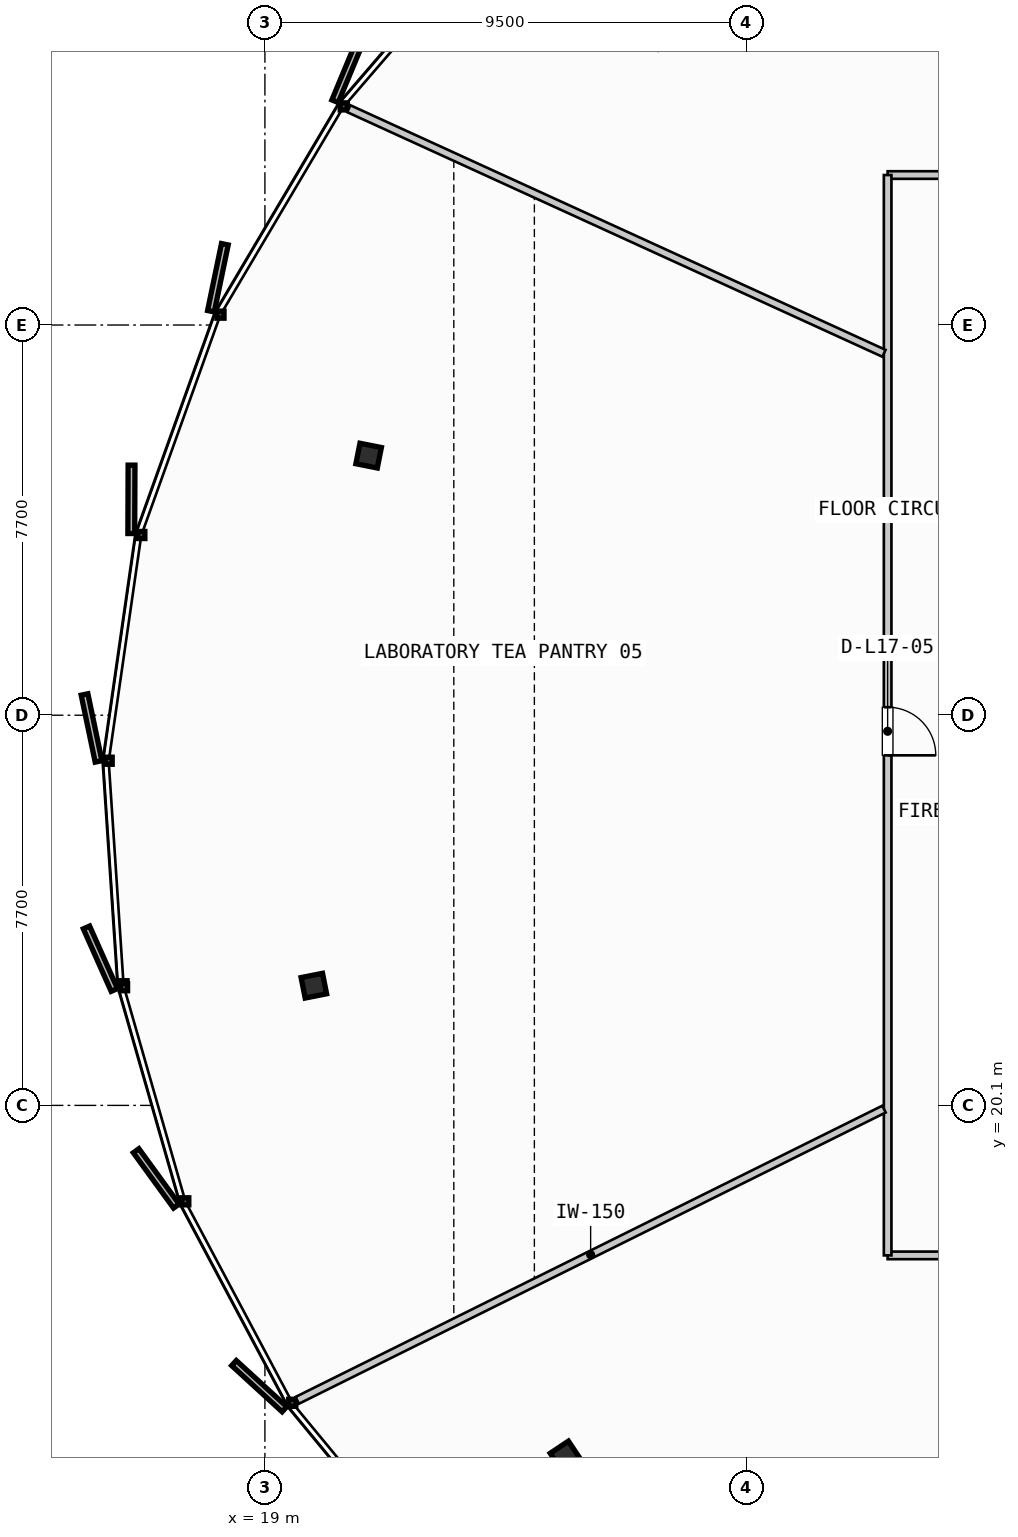
"""IFC4 building model, lengths in metres.
Left out: names, types, materials, properties, quantities, classifications, styles, units other than length and angle.
Written with IfcOpenShell. Run it as: python <this file> out.ifc"""

import sys

from ifc_helpers import new_model, si_unit, direction, frame, frame_2d, origin, origin_2d, place, context, subcontext, project, spatial, rectangle, i_section, extrude, source, transform, mapped, element, fill, save


model = new_model("IFC4")
c1 = context("Model", 3, precision=1e-05, world=origin(), true_north=direction((0.0, 1.0)))
c2 = subcontext(c1, "Body", "Model", "MODEL_VIEW")
j1 = project(units=[si_unit("LENGTHUNIT", "METRE"), si_unit("PLANEANGLEUNIT", "RADIAN")], contexts=[c1])
p1 = place(None, origin())
s1 = spatial("IfcSite", under=j1, at=p1, CompositionType="ELEMENT")
p2 = place(p1, origin())
s2 = spatial("IfcBuilding", under=s1, at=p2, CompositionType="ELEMENT")
p3 = place(p2, frame((0.0, 0.0, 71.4)))
s3 = spatial("IfcBuildingStorey", under=s2, at=p3, CompositionType="ELEMENT", Elevation=71.4)
m1 = source(origin(), c2, "Body", "SweptSolid", [
    extrude(i_section(OverallWidth=0.412, OverallDepth=0.431, WebThickness=0.042, FlangeThickness=0.068, FilletRadius=0.015, at=origin_2d()), origin(), (0.0, 0.0, 1.0), 3.54),
])
for number, where, z_axis, x_axis in (
    (1, (21.047, 32.923, 0.0), (0.0, 0.0, 1.0), (-0.981, 0.195, 0.0)),
    (2, (19.966, 22.462, 0.0), (0.0, 0.0, 1.0), (-0.981, -0.195, 0.0)),
    (3, (24.925, 13.183, 0.0), (0.0, 0.0, 1.0), (-0.831, -0.556, 0.0)),
):
    element("IfcColumn", number, at=place(p3, frame(where, z_axis=z_axis, x_axis=x_axis)), inside=s3, PredefinedType="COLUMN", context=c2, shape_type="MappedRepresentation", body=[
        mapped(m1, transform((0.0, 0.0, 0.0), scale=1.0)),
    ])
p4 = place(p3, frame((31.29, 17.14, 0.0), z_axis=(0.0, 0.0, 1.0), x_axis=(1.0, 0.0, 0.0)))
e4 = element("IfcWall", 4, at=p4, inside=s3, PredefinedType="PARTITIONING", context=c2, shape_type="SweptSolid", body=[
    extrude(rectangle(XDim=29.46, YDim=0.15, at=frame_2d((14.73, 0.0))), origin(), (0.0, 0.0, 1.0), 2.495),
])
p5 = place(p4, frame((14.255, 0.0, 0.0)))
e5 = element("IfcOpeningElement", 5, at=p5, cuts=e4, PredefinedType="OPENING", context=c2, shape_type="SweptSolid", body=[
    extrude(rectangle(XDim=0.95, YDim=2.15, at=frame_2d((0.475, 1.075))), frame((0.0, 0.085, 0.0), z_axis=(0.0, -1.0, 0.0), x_axis=(1.0, 0.0, 0.0)), (0.0, 0.0, 1.0), 0.17),
])
p6 = place(p3, frame((60.75, 38.46, 0.0), z_axis=(0.0, 0.0, 1.0), x_axis=(-1.0, 0.0, 0.0)))
e6 = element("IfcWall", 6, at=p6, inside=s3, PredefinedType="PARTITIONING", context=c2, shape_type="SweptSolid", body=[
    extrude(rectangle(XDim=29.46, YDim=0.15, at=frame_2d((14.73, 0.0))), origin(), (0.0, 0.0, 1.0), 2.495),
])
p7 = place(p6, frame((7.337, 0.0, 0.0)))
e7 = element("IfcOpeningElement", 7, at=p7, cuts=e6, PredefinedType="OPENING", context=c2, shape_type="SweptSolid", body=[
    extrude(rectangle(XDim=0.95, YDim=2.15, at=frame_2d((0.475, 1.075))), frame((0.0, 0.085, 0.0), z_axis=(0.0, -1.0, 0.0), x_axis=(1.0, 0.0, 0.0)), (0.0, 0.0, 1.0), 0.17),
])
p8 = place(p6, frame((20.722, 0.0, 0.0)))
e8 = element("IfcOpeningElement", 8, at=p8, cuts=e6, PredefinedType="OPENING", context=c2, shape_type="SweptSolid", body=[
    extrude(rectangle(XDim=0.95, YDim=2.15, at=frame_2d((0.475, 1.075))), frame((0.0, 0.085, 0.0), z_axis=(0.0, -1.0, 0.0), x_axis=(1.0, 0.0, 0.0)), (0.0, 0.0, 1.0), 0.17),
])
p9 = place(p3, frame((31.29, 38.46, 0.0), z_axis=(0.0, 0.0, 1.0), x_axis=(0.0, -1.0, 0.0)))
e9 = element("IfcWall", 9, at=p9, inside=s3, PredefinedType="PARTITIONING", context=c2, shape_type="SweptSolid", body=[
    extrude(rectangle(XDim=21.32, YDim=0.15, at=frame_2d((10.66, 0.0))), origin(), (0.0, 0.0, 1.0), 2.495),
])
p10 = place(p9, frame((10.502, 0.0, 0.0)))
e10 = element("IfcOpeningElement", 10, at=p10, cuts=e9, PredefinedType="OPENING", context=c2, shape_type="SweptSolid", body=[
    extrude(rectangle(XDim=0.95, YDim=2.15, at=frame_2d((0.475, 1.075))), frame((0.0, 0.085, 0.0), z_axis=(0.0, -1.0, 0.0), x_axis=(1.0, 0.0, 0.0)), (0.0, 0.0, 1.0), 0.17),
])
p11 = place(p3, frame((31.218, 20.027, 0.0), z_axis=(0.0, 0.0, 1.0), x_axis=(-0.895741488964, -0.44457528603, 0.0)))
e11 = element("IfcWall", 11, at=p11, inside=s3, PredefinedType="PARTITIONING", context=c2, shape_type="SweptSolid", body=[
    extrude(rectangle(XDim=12.928, YDim=0.15, at=frame_2d((6.464, 0.0))), origin(), (0.0, 0.0, 1.0), 2.495),
])
p12 = place(p3, frame((31.217, 34.942, 0.0), z_axis=(0.0, 0.0, 1.0), x_axis=(-0.909514903572, 0.415671312673, 0.0)))
e12 = element("IfcWall", 12, at=p12, inside=s3, PredefinedType="PARTITIONING", context=c2, shape_type="SweptSolid", body=[
    extrude(rectangle(XDim=11.612, YDim=0.15, at=frame_2d((5.806, 0.0))), origin(), (0.0, 0.0, 1.0), 2.495),
])
m2 = source(origin(), c2, "Body", "SweptSolid", [
    extrude(rectangle(XDim=0.95, YDim=2.15, at=frame_2d((0.475, 1.075))), frame((0.0, 0.025, 0.0), z_axis=(0.0, -1.0, 0.0), x_axis=(1.0, 0.0, 0.0)), (0.0, 0.0, 1.0), 0.05),
])
p13 = place(p10, origin())
e13 = element("IfcDoor", 13, at=p13, inside=s3, OperationType="SINGLE_SWING_RIGHT", PredefinedType="DOOR", context=c2, shape_type="MappedRepresentation", body=[
    mapped(m2, transform((0.0, 0.0, 0.0), scale=1.0)),
])
fill(e10, e13)
save(model, sys.argv[1])
